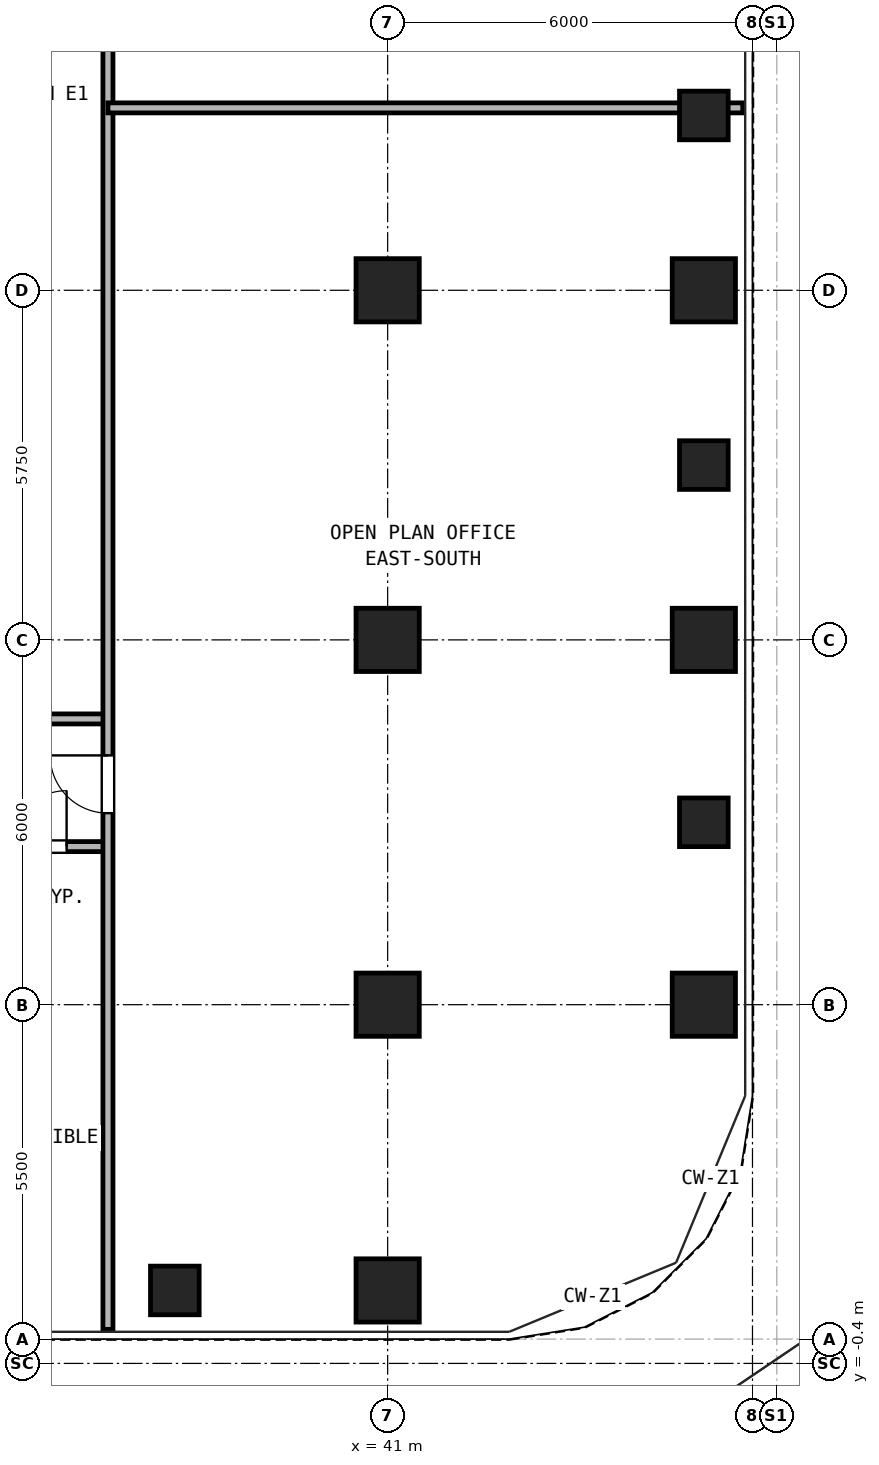
"""IFC4 building model, lengths in metres.
Left out: names, types, materials, properties, quantities, classifications, styles, units other than length and angle.
Written with IfcOpenShell. Run it as: python <this file> out.ifc"""

import sys

from ifc_helpers import new_model, si_unit, direction, frame, frame_2d, origin, origin_2d, place, context, subcontext, project, spatial, rectangle, hollow_rectangle, extrude, source, transform, mapped, element, fill, save


model = new_model("IFC4")
c1 = context("Model", 3, precision=1e-05, world=origin(), true_north=direction((0.0, 1.0)))
c2 = subcontext(c1, "Body", "Model", "MODEL_VIEW")
j1 = project(units=[si_unit("LENGTHUNIT", "METRE"), si_unit("PLANEANGLEUNIT", "RADIAN")], contexts=[c1])
p1 = place(None, origin())
s1 = spatial("IfcSite", under=j1, at=p1, CompositionType="ELEMENT")
p2 = place(p1, origin())
s2 = spatial("IfcBuilding", under=s1, at=p2, CompositionType="ELEMENT")
p3 = place(p2, frame((0.0, 0.0, 47.7)))
s3 = spatial("IfcBuildingStorey", under=s2, at=p3, CompositionType="ELEMENT", Elevation=47.7)
m1 = source(origin(), c2, "Body", "SweptSolid", [
    extrude(hollow_rectangle(XDim=1.04, YDim=1.04, WallThickness=0.065, at=origin_2d()), origin(), (0.0, 0.0, 1.0), 3.32),
])
for number, where, z_axis, x_axis in (
    (1, (41.0, 0.8, 0.0), (0.0, 0.0, 1.0), (1.0, 0.0, 0.0)),
    (2, (46.2, 5.5, 0.0), (0.0, 0.0, 1.0), (1.0, 0.0, 0.0)),
    (3, (46.2, 11.5, 0.0), (0.0, 0.0, 1.0), (1.0, 0.0, 0.0)),
    (4, (46.2, 17.25, 0.0), (0.0, 0.0, 1.0), (1.0, 0.0, 0.0)),
    (5, (41.0, 5.5, 0.0), (0.0, 0.0, 1.0), (1.0, 0.0, 0.0)),
    (6, (41.0, 11.5, 0.0), (0.0, 0.0, 1.0), (1.0, 0.0, 0.0)),
    (7, (41.0, 17.25, 0.0), (0.0, 0.0, 1.0), (1.0, 0.0, 0.0)),
):
    element("IfcColumn", number, at=place(p3, frame(where, z_axis=z_axis, x_axis=x_axis)), inside=s3, PredefinedType="COLUMN", context=c2, shape_type="MappedRepresentation", body=[
        mapped(m1, transform((0.0, 0.0, 0.0), x_axis=(1.0, 0.0, 0.0), y_axis=(0.0, 1.0, 0.0), z_axis=(0.0, 0.0, 1.0), scale=1.0)),
    ])
m2 = source(origin(), c2, "Body", "SweptSolid", [
    extrude(hollow_rectangle(XDim=0.8, YDim=0.8, WallThickness=0.045, at=origin_2d()), origin(), (0.0, 0.0, 1.0), 3.32),
])
for number, where, z_axis, x_axis in (
    (8, (37.5, 0.8, 0.0), (0.0, 0.0, 1.0), (1.0, 0.0, 0.0)),
    (9, (46.2, 8.5, 0.0), (0.0, 0.0, 1.0), (1.0, 0.0, 0.0)),
    (10, (46.2, 14.375, 0.0), (0.0, 0.0, 1.0), (1.0, 0.0, 0.0)),
    (11, (46.2, 20.125, 0.0), (0.0, 0.0, 1.0), (1.0, 0.0, 0.0)),
):
    element("IfcColumn", number, at=place(p3, frame(where, z_axis=z_axis, x_axis=x_axis)), inside=s3, PredefinedType="COLUMN", context=c2, shape_type="MappedRepresentation", body=[
        mapped(m2, transform((0.0, 0.0, 0.0), x_axis=(1.0, 0.0, 0.0), y_axis=(0.0, 1.0, 0.0), z_axis=(0.0, 0.0, 1.0), scale=1.0)),
    ])
p4 = place(p3, frame((10.6, 8.1, 0.0), z_axis=(0.0, 0.0, 1.0), x_axis=(1.0, 0.0, 0.0)))
e12 = element("IfcWall", 12, at=p4, inside=s3, PredefinedType="PARTITIONING", context=c2, shape_type="SweptSolid", body=[
    extrude(rectangle(XDim=25.8, YDim=0.165, at=frame_2d((12.9, 0.0))), origin(), (0.0, 0.0, 1.0), 3.32),
])
p5 = place(p4, frame((7.2, 0.0, 0.0)))
e13 = element("IfcOpeningElement", 13, at=p5, cuts=e12, PredefinedType="OPENING", context=c2, shape_type="SweptSolid", body=[
    extrude(rectangle(XDim=0.95, YDim=2.15, at=frame_2d((0.475, 1.075))), frame((0.0, 0.093, 0.0), z_axis=(0.0, -1.0, 0.0), x_axis=(1.0, 0.0, 0.0)), (0.0, 0.0, 1.0), 0.185),
])
p6 = place(p4, frame((17.65, 0.0, 0.0)))
e14 = element("IfcOpeningElement", 14, at=p6, cuts=e12, PredefinedType="OPENING", context=c2, shape_type="SweptSolid", body=[
    extrude(rectangle(XDim=0.95, YDim=2.15, at=frame_2d((0.475, 1.075))), frame((0.0, 0.093, 0.0), z_axis=(0.0, -1.0, 0.0), x_axis=(1.0, 0.0, 0.0)), (0.0, 0.0, 1.0), 0.185),
])
p7 = place(p4, frame((21.75, 0.0, 0.0)))
e15 = element("IfcOpeningElement", 15, at=p7, cuts=e12, PredefinedType="OPENING", context=c2, shape_type="SweptSolid", body=[
    extrude(rectangle(XDim=0.95, YDim=2.15, at=frame_2d((0.475, 1.075))), frame((0.0, 0.093, 0.0), z_axis=(0.0, -1.0, 0.0), x_axis=(1.0, 0.0, 0.0)), (0.0, 0.0, 1.0), 0.185),
])
p8 = place(p4, frame((24.2, 0.0, 0.0)))
e16 = element("IfcOpeningElement", 16, at=p8, cuts=e12, PredefinedType="OPENING", context=c2, shape_type="SweptSolid", body=[
    extrude(rectangle(XDim=0.92, YDim=2.1, at=frame_2d((0.46, 1.05))), frame((0.0, 0.093, 0.0), z_axis=(0.0, -1.0, 0.0), x_axis=(1.0, 0.0, 0.0)), (0.0, 0.0, 1.0), 0.185),
])
p9 = place(p3, frame((30.7, 10.2, 0.0), z_axis=(0.0, 0.0, 1.0), x_axis=(1.0, 0.0, 0.0)))
e17 = element("IfcWall", 17, at=p9, inside=s3, PredefinedType="PARTITIONING", context=c2, shape_type="SweptSolid", body=[
    extrude(rectangle(XDim=5.7, YDim=0.165, at=frame_2d((2.85, 0.0))), origin(), (0.0, 0.0, 1.0), 3.32),
])
p10 = place(p3, frame((36.4, 0.16, 0.0), z_axis=(0.0, 0.0, 1.0), x_axis=(0.0, 1.0, 0.0)))
e18 = element("IfcWall", 18, at=p10, inside=s3, PredefinedType="PARTITIONING", context=c2, shape_type="SweptSolid", body=[
    extrude(rectangle(XDim=40.18, YDim=0.165, at=frame_2d((20.09, 0.0))), origin(), (0.0, 0.0, 1.0), 3.32),
])
p11 = place(p10, frame((8.49, 0.0, 0.0)))
e19 = element("IfcOpeningElement", 19, at=p11, cuts=e18, PredefinedType="OPENING", context=c2, shape_type="SweptSolid", body=[
    extrude(rectangle(XDim=0.95, YDim=2.15, at=frame_2d((0.475, 1.075))), frame((0.0, 0.093, 0.0), z_axis=(0.0, -1.0, 0.0), x_axis=(1.0, 0.0, 0.0)), (0.0, 0.0, 1.0), 0.185),
])
p12 = place(p10, frame((30.29, 0.0, 0.0)))
e20 = element("IfcOpeningElement", 20, at=p12, cuts=e18, PredefinedType="OPENING", context=c2, shape_type="SweptSolid", body=[
    extrude(rectangle(XDim=0.95, YDim=2.15, at=frame_2d((0.475, 1.075))), frame((0.0, 0.093, 0.0), z_axis=(0.0, -1.0, 0.0), x_axis=(1.0, 0.0, 0.0)), (0.0, 0.0, 1.0), 0.185),
])
p13 = place(p3, frame((36.4, 20.25, 0.0), z_axis=(0.0, 0.0, 1.0), x_axis=(1.0, 0.0, 0.0)))
e21 = element("IfcWall", 21, at=p13, inside=s3, PredefinedType="PARTITIONING", context=c2, shape_type="SweptSolid", body=[
    extrude(rectangle(XDim=10.44, YDim=0.165, at=frame_2d((5.22, 0.0))), origin(), (0.0, 0.0, 1.0), 2.898),
])
p14 = place(p8, frame((0.92, 0.0, 0.0), z_axis=(0.0, 0.0, 1.0), x_axis=(-1.0, 0.0, 0.0)))
e22 = element("IfcDoor", 22, at=p14, inside=s3, OperationType="SINGLE_SWING_RIGHT", PredefinedType="DOOR", context=c2, shape_type="SweptSolid", body=[
    extrude(rectangle(XDim=0.92, YDim=2.1, at=frame_2d((0.46, 1.05))), frame((0.0, 0.025, 0.0), z_axis=(0.0, -1.0, 0.0), x_axis=(1.0, 0.0, 0.0)), (0.0, 0.0, 1.0), 0.05),
])
fill(e16, e22)
p15 = place(p11, origin())
e23 = element("IfcDoor", 23, at=p15, inside=s3, OperationType="SINGLE_SWING_RIGHT", PredefinedType="DOOR", context=c2, shape_type="SweptSolid", body=[
    extrude(rectangle(XDim=0.95, YDim=2.15, at=frame_2d((0.475, 1.075))), frame((0.0, 0.025, 0.0), z_axis=(0.0, -1.0, 0.0), x_axis=(1.0, 0.0, 0.0)), (0.0, 0.0, 1.0), 0.05),
])
fill(e19, e23)
save(model, sys.argv[1])
